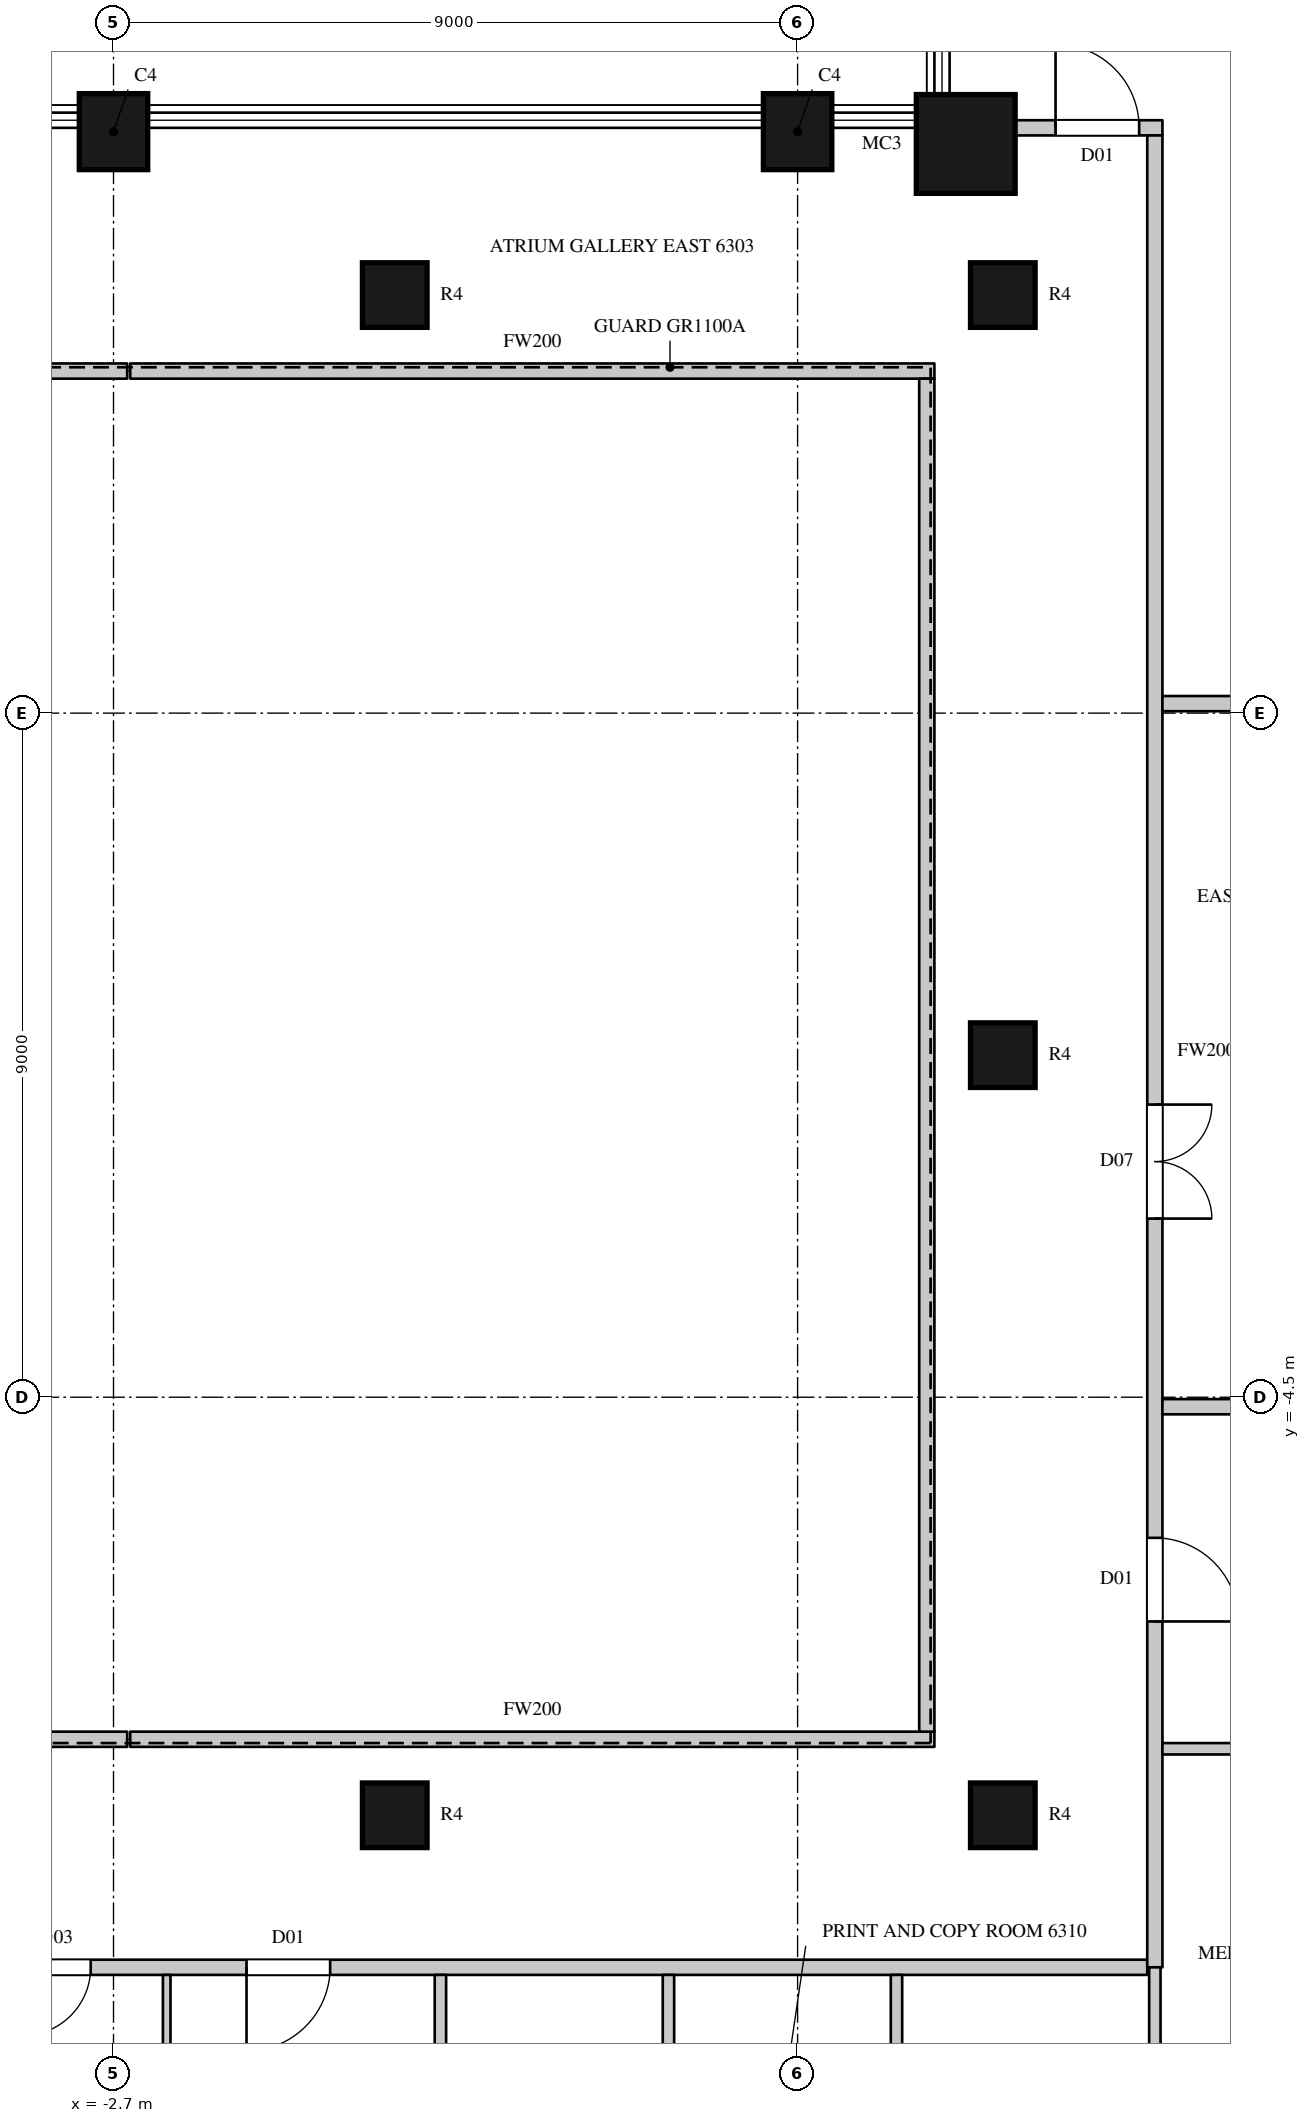
"""IFC4 building model, lengths in metres.
Left out: names, types, materials, properties, quantities, classifications, styles, units other than length and angle.
Written with IfcOpenShell. Run it as: python <this file> out.ifc"""

import sys

from ifc_helpers import new_model, si_unit, direction, frame, frame_2d, origin, origin_2d, place, context, subcontext, project, spatial, rectangle, circle, extrude, element, fill, save


model = new_model("IFC4")
c1 = context("Model", 3, precision=1e-05, world=origin(), true_north=direction((0.0, 1.0)))
c2 = subcontext(c1, "Body", "Model", "MODEL_VIEW")
j1 = project(units=[si_unit("LENGTHUNIT", "METRE"), si_unit("PLANEANGLEUNIT", "RADIAN")], contexts=[c1])
p1 = place(None, origin())
s1 = spatial("IfcSite", under=j1, at=p1, CompositionType="ELEMENT")
p2 = place(p1, origin())
s2 = spatial("IfcBuilding", under=s1, at=p2, CompositionType="ELEMENT")
p3 = place(p2, frame((0.0, 0.0, 280.3)))
s3 = spatial("IfcBuildingStorey", under=s2, at=p3, CompositionType="ELEMENT", Elevation=280.3)
p4 = place(p3, frame((8.512, 11.988, 0.0), z_axis=(0.0, 0.0, 1.0), x_axis=(1.0, 0.0, 0.0)))
e1 = element("IfcColumn", 1, at=p4, inside=s3, PredefinedType="COLUMN", context=c2, shape_type="SweptSolid", body=[
    extrude(circle(Radius=0.65, at=origin_2d()), origin(), (0.0, 0.0, 1.0), 4.1),
])
for number, where, z_axis, x_axis in (
    (2, (6.3, 12.15, 0.0), (0.0, 0.0, 1.0), (-1.0, 0.0, 0.0)),
    (3, (-2.7, 12.15, 0.0), (0.0, 0.0, 1.0), (-1.0, 0.0, 0.0)),
):
    element("IfcColumn", number, at=place(p3, frame(where, z_axis=z_axis, x_axis=x_axis)), inside=s3, PredefinedType="COLUMN", context=c2, shape_type="SweptSolid", body=[
        extrude(rectangle(XDim=0.9, YDim=1.0, at=origin_2d()), origin(), (0.0, 0.0, 1.0), 4.1),
    ])
for number, where, z_axis, x_axis in (
    (4, (1.0, -10.0, 0.0), (0.0, 0.0, 1.0), (1.0, 0.0, 0.0)),
    (5, (1.0, 10.0, 0.0), (0.0, 0.0, 1.0), (1.0, 0.0, 0.0)),
    (6, (9.0, -10.0, 0.0), (0.0, 0.0, 1.0), (1.0, 0.0, 0.0)),
    (7, (9.0, 0.0, 0.0), (0.0, 0.0, 1.0), (1.0, 0.0, 0.0)),
    (8, (9.0, 10.0, 0.0), (0.0, 0.0, 1.0), (1.0, 0.0, 0.0)),
):
    element("IfcColumn", number, at=place(p3, frame(where, z_axis=z_axis, x_axis=x_axis)), inside=s3, PredefinedType="COLUMN", context=c2, shape_type="SweptSolid", body=[
        extrude(circle(Radius=0.425, at=origin_2d()), origin(), (0.0, 0.0, 1.0), 4.1),
    ])
p5 = place(p3, frame((-10.9, -12.0, 0.0), z_axis=(0.0, 0.0, 1.0), x_axis=(1.0, 0.0, 0.0)))
e9 = element("IfcWall", 9, at=p5, inside=s3, PredefinedType="PARTITIONING", context=c2, shape_type="SweptSolid", body=[
    extrude(rectangle(XDim=21.8, YDim=0.2, at=frame_2d((10.9, 0.0))), origin(), (0.0, 0.0, 1.0), 3.8),
])
p6 = place(p5, frame((1.1, 0.0, 0.0)))
e10 = element("IfcOpeningElement", 10, at=p6, cuts=e9, PredefinedType="OPENING", context=c2, shape_type="SweptSolid", body=[
    extrude(rectangle(XDim=0.9, YDim=2.2, at=frame_2d((0.45, 1.1))), frame((0.0, 0.11, 0.0), z_axis=(0.0, -1.0, 0.0), x_axis=(1.0, 0.0, 0.0)), (0.0, 0.0, 1.0), 0.22),
])
p7 = place(p5, frame((4.9, 0.0, 0.0)))
e11 = element("IfcOpeningElement", 11, at=p7, cuts=e9, PredefinedType="OPENING", context=c2, shape_type="SweptSolid", body=[
    extrude(rectangle(XDim=0.9, YDim=2.2, at=frame_2d((0.45, 1.1))), frame((0.0, 0.11, 0.0), z_axis=(0.0, -1.0, 0.0), x_axis=(1.0, 0.0, 0.0)), (0.0, 0.0, 1.0), 0.22),
])
p8 = place(p5, frame((7.0, 0.0, 0.0)))
e12 = element("IfcOpeningElement", 12, at=p8, cuts=e9, PredefinedType="OPENING", context=c2, shape_type="SweptSolid", body=[
    extrude(rectangle(XDim=0.9, YDim=2.2, at=frame_2d((0.45, 1.1))), frame((0.0, 0.11, 0.0), z_axis=(0.0, -1.0, 0.0), x_axis=(1.0, 0.0, 0.0)), (0.0, 0.0, 1.0), 0.22),
])
p9 = place(p5, frame((9.95, 0.0, 0.0)))
e13 = element("IfcOpeningElement", 13, at=p9, cuts=e9, PredefinedType="OPENING", context=c2, shape_type="SweptSolid", body=[
    extrude(rectangle(XDim=1.1, YDim=2.4, at=frame_2d((0.55, 1.2))), frame((0.0, 0.11, 0.0), z_axis=(0.0, -1.0, 0.0), x_axis=(1.0, 0.0, 0.0)), (0.0, 0.0, 1.0), 0.22),
])
for number, where, z_axis, x_axis in (
    (14, (-6.1, -9.0, 0.0), (0.0, 0.0, 1.0), (1.0, 0.0, 0.0)),
    (15, (-6.1, 9.0, 0.0), (0.0, 0.0, 1.0), (1.0, 0.0, 0.0)),
):
    element("IfcWall", number, at=place(p3, frame(where, z_axis=z_axis, x_axis=x_axis)), inside=s3, PredefinedType="PARTITIONING", context=c2, shape_type="SweptSolid", body=[
        extrude(rectangle(XDim=3.58, YDim=0.2, at=frame_2d((1.79, 0.0))), origin(), (0.0, 0.0, 1.0), 3.8),
    ])
for number, where, z_axis, x_axis in (
    (16, (-2.48, -9.0, 0.0), (0.0, 0.0, 1.0), (1.0, 0.0, 0.0)),
    (17, (-2.48, 9.0, 0.0), (0.0, 0.0, 1.0), (1.0, 0.0, 0.0)),
):
    element("IfcWall", number, at=place(p3, frame(where, z_axis=z_axis, x_axis=x_axis)), inside=s3, PredefinedType="PARTITIONING", context=c2, shape_type="SweptSolid", body=[
        extrude(rectangle(XDim=10.58, YDim=0.2, at=frame_2d((5.29, 0.0))), origin(), (0.0, 0.0, 1.0), 3.8),
    ])
p10 = place(p3, frame((8.0, -8.9, 0.0), z_axis=(0.0, 0.0, 1.0), x_axis=(0.0, 1.0, 0.0)))
e18 = element("IfcWall", 18, at=p10, inside=s3, PredefinedType="PARTITIONING", context=c2, shape_type="SweptSolid", body=[
    extrude(rectangle(XDim=17.8, YDim=0.2, at=frame_2d((8.9, 0.0))), origin(), (0.0, 0.0, 1.0), 3.8),
])
p11 = place(p3, frame((9.144, 12.2, 0.0), z_axis=(0.0, 0.0, 1.0), x_axis=(1.0, 0.0, 0.0)))
e19 = element("IfcWall", 19, at=p11, inside=s3, PredefinedType="PARTITIONING", context=c2, shape_type="SweptSolid", body=[
    extrude(rectangle(XDim=1.956, YDim=0.2, at=frame_2d((0.978, 0.0))), origin(), (0.0, 0.0, 1.0), 3.8),
])
p12 = place(p11, frame((0.55, 0.0, 0.0)))
e20 = element("IfcOpeningElement", 20, at=p12, cuts=e19, PredefinedType="OPENING", context=c2, shape_type="SweptSolid", body=[
    extrude(rectangle(XDim=1.1, YDim=2.4, at=frame_2d((0.55, 1.2))), frame((0.0, 0.11, 0.0), z_axis=(0.0, -1.0, 0.0), x_axis=(1.0, 0.0, 0.0)), (0.0, 0.0, 1.0), 0.22),
])
p13 = place(p3, frame((11.0, -12.0, 0.0), z_axis=(0.0, 0.0, 1.0), x_axis=(0.0, 1.0, 0.0)))
e21 = element("IfcWall", 21, at=p13, inside=s3, PredefinedType="PARTITIONING", context=c2, shape_type="SweptSolid", body=[
    extrude(rectangle(XDim=24.1, YDim=0.2, at=frame_2d((12.05, 0.0))), origin(), (0.0, 0.0, 1.0), 3.8),
])
p14 = place(p13, frame((9.85, 0.0, 0.0)))
e22 = element("IfcOpeningElement", 22, at=p14, cuts=e21, PredefinedType="OPENING", context=c2, shape_type="SweptSolid", body=[
    extrude(rectangle(XDim=1.5, YDim=2.4, at=frame_2d((0.75, 1.2))), frame((0.0, 0.11, 0.0), z_axis=(0.0, -1.0, 0.0), x_axis=(1.0, 0.0, 0.0)), (0.0, 0.0, 1.0), 0.22),
])
p15 = place(p13, frame((4.55, 0.0, 0.0)))
e23 = element("IfcOpeningElement", 23, at=p15, cuts=e21, PredefinedType="OPENING", context=c2, shape_type="SweptSolid", body=[
    extrude(rectangle(XDim=1.1, YDim=2.4, at=frame_2d((0.55, 1.2))), frame((0.0, 0.11, 0.0), z_axis=(0.0, -1.0, 0.0), x_axis=(1.0, 0.0, 0.0)), (0.0, 0.0, 1.0), 0.22),
])
for number, where, z_axis, x_axis in (
    (24, (11.1, -4.625, 0.0), (0.0, 0.0, 1.0), (1.0, 0.0, 0.0)),
    (25, (11.1, 4.625, 0.0), (0.0, 0.0, 1.0), (1.0, 0.0, 0.0)),
):
    element("IfcWall", number, at=place(p3, frame(where, z_axis=z_axis, x_axis=x_axis)), inside=s3, PredefinedType="PARTITIONING", context=c2, shape_type="SweptSolid", body=[
        extrude(rectangle(XDim=3.575, YDim=0.2, at=frame_2d((1.788, 0.0))), origin(), (0.0, 0.0, 1.0), 3.8),
    ])
p16 = place(p3, frame((1.601, -15.525, 0.0), z_axis=(0.0, 0.0, 1.0), x_axis=(0.0, 1.0, 0.0)))
e26 = element("IfcWall", 26, at=p16, inside=s3, PredefinedType="PARTITIONING", context=c2, shape_type="SweptSolid", body=[
    extrude(rectangle(XDim=3.425, YDim=0.15, at=frame_2d((1.712, 0.0))), origin(), (0.0, 0.0, 1.0), 3.8),
])
p17 = place(p16, frame((1.25, 0.0, 0.0)))
e27 = element("IfcOpeningElement", 27, at=p17, cuts=e26, PredefinedType="OPENING", context=c2, shape_type="SweptSolid", body=[
    extrude(rectangle(XDim=0.95, YDim=2.2, at=frame_2d((0.475, 1.1))), frame((0.0, 0.085, 0.0), z_axis=(0.0, -1.0, 0.0), x_axis=(1.0, 0.0, 0.0)), (0.0, 0.0, 1.0), 0.17),
])
for number, where, z_axis, x_axis in (
    (28, (4.601, -15.525, 0.0), (0.0, 0.0, 1.0), (0.0, 1.0, 0.0)),
    (29, (7.601, -15.525, 0.0), (0.0, 0.0, 1.0), (0.0, 1.0, 0.0)),
):
    element("IfcWall", number, at=place(p3, frame(where, z_axis=z_axis, x_axis=x_axis)), inside=s3, PredefinedType="PARTITIONING", context=c2, shape_type="SweptSolid", body=[
        extrude(rectangle(XDim=3.425, YDim=0.15, at=frame_2d((1.712, 0.0))), origin(), (0.0, 0.0, 1.0), 3.8),
    ])
p18 = place(p3, frame((11.0, -20.721, 0.0), z_axis=(0.0, 0.0, 1.0), x_axis=(0.0, 1.0, 0.0)))
e30 = element("IfcWall", 30, at=p18, inside=s3, PredefinedType="PARTITIONING", context=c2, shape_type="SweptSolid", body=[
    extrude(rectangle(XDim=8.721, YDim=0.15, at=frame_2d((4.361, 0.0))), origin(), (0.0, 0.0, 1.0), 3.8),
])
p19 = place(p3, frame((11.1, -9.125, 0.0), z_axis=(0.0, 0.0, 1.0), x_axis=(1.0, 0.0, 0.0)))
e31 = element("IfcWall", 31, at=p19, inside=s3, PredefinedType="PARTITIONING", context=c2, shape_type="SweptSolid", body=[
    extrude(rectangle(XDim=3.875, YDim=0.15, at=frame_2d((1.938, 0.0))), origin(), (0.0, 0.0, 1.0), 3.8),
])
p20 = place(p19, frame((2.65, 0.0, 0.0)))
e32 = element("IfcOpeningElement", 32, at=p20, cuts=e31, PredefinedType="OPENING", context=c2, shape_type="SweptSolid", body=[
    extrude(rectangle(XDim=0.95, YDim=2.2, at=frame_2d((0.475, 1.1))), frame((0.0, 0.085, 0.0), z_axis=(0.0, -1.0, 0.0), x_axis=(1.0, 0.0, 0.0)), (0.0, 0.0, 1.0), 0.17),
])
p21 = place(p3, frame((-2.0, -23.447, 0.0), z_axis=(0.0, 0.0, 1.0), x_axis=(0.0, 1.0, 0.0)))
e33 = element("IfcWall", 33, at=p21, inside=s3, PredefinedType="PARTITIONING", context=c2, shape_type="SweptSolid", body=[
    extrude(rectangle(XDim=11.347, YDim=0.1, at=frame_2d((5.674, 0.0))), origin(), (0.0, 0.0, 1.0), 3.8),
])
p22 = place(p14, origin())
e34 = element("IfcDoor", 34, at=p22, inside=s3, OperationType="DOUBLE_DOOR_SINGLE_SWING", PredefinedType="DOOR", context=c2, shape_type="SweptSolid", body=[
    extrude(rectangle(XDim=1.5, YDim=2.4, at=frame_2d((0.75, 1.2))), frame((0.0, 0.025, 0.0), z_axis=(0.0, -1.0, 0.0), x_axis=(1.0, 0.0, 0.0)), (0.0, 0.0, 1.0), 0.05),
])
fill(e22, e34)
p23 = place(p8, origin())
e35 = element("IfcDoor", 35, at=p23, inside=s3, OperationType="SINGLE_SWING_RIGHT", PredefinedType="DOOR", context=c2, shape_type="SweptSolid", body=[
    extrude(rectangle(XDim=0.9, YDim=2.2, at=frame_2d((0.45, 1.1))), frame((0.0, 0.025, 0.0), z_axis=(0.0, -1.0, 0.0), x_axis=(1.0, 0.0, 0.0)), (0.0, 0.0, 1.0), 0.05),
])
fill(e12, e35)
p24 = place(p9, origin())
e36 = element("IfcDoor", 36, at=p24, inside=s3, OperationType="SINGLE_SWING_RIGHT", PredefinedType="DOOR", context=c2, shape_type="SweptSolid", body=[
    extrude(rectangle(XDim=1.1, YDim=2.4, at=frame_2d((0.55, 1.2))), frame((0.0, 0.025, 0.0), z_axis=(0.0, -1.0, 0.0), x_axis=(1.0, 0.0, 0.0)), (0.0, 0.0, 1.0), 0.05),
])
fill(e13, e36)
p25 = place(p12, origin())
e37 = element("IfcDoor", 37, at=p25, inside=s3, OperationType="SINGLE_SWING_LEFT", PredefinedType="DOOR", context=c2, shape_type="SweptSolid", body=[
    extrude(rectangle(XDim=1.1, YDim=2.4, at=frame_2d((0.55, 1.2))), frame((0.0, 0.025, 0.0), z_axis=(0.0, -1.0, 0.0), x_axis=(1.0, 0.0, 0.0)), (0.0, 0.0, 1.0), 0.05),
])
fill(e20, e37)
p26 = place(p15, origin())
e38 = element("IfcDoor", 38, at=p26, inside=s3, OperationType="SINGLE_SWING_RIGHT", PredefinedType="DOOR", context=c2, shape_type="SweptSolid", body=[
    extrude(rectangle(XDim=1.1, YDim=2.4, at=frame_2d((0.55, 1.2))), frame((0.0, 0.025, 0.0), z_axis=(0.0, -1.0, 0.0), x_axis=(1.0, 0.0, 0.0)), (0.0, 0.0, 1.0), 0.05),
])
fill(e23, e38)
save(model, sys.argv[1])
